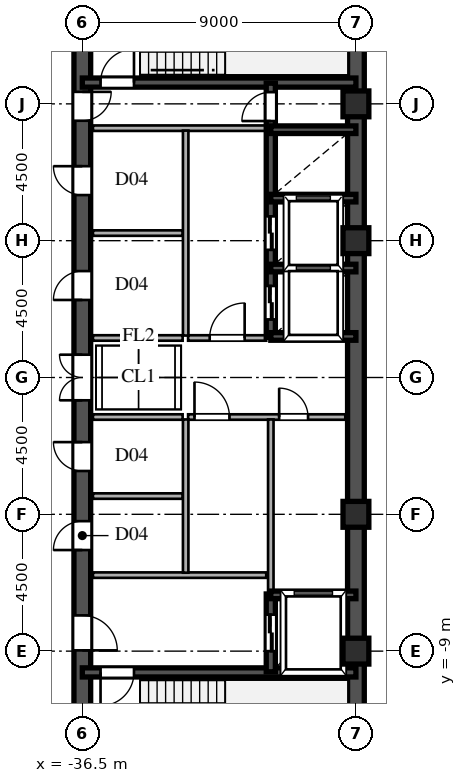
"""IFC4 building model, lengths in metres.
Left out: names, types, materials, properties, quantities, classifications, styles, units other than length and angle.
Written with IfcOpenShell. Run it as: python <this file> out.ifc"""

import sys

from ifc_helpers import new_model, si_unit, direction, frame, frame_2d, origin, origin_2d, place, context, subcontext, project, spatial, rectangle, hollow_rectangle, extrude, source, transform, mapped, element, fill, save


model = new_model("IFC4")
c1 = context("Model", 3, precision=1e-05, world=origin(), true_north=direction((0.0, 1.0)))
c2 = subcontext(c1, "Body", "Model", "MODEL_VIEW")
j1 = project(units=[si_unit("LENGTHUNIT", "METRE"), si_unit("PLANEANGLEUNIT", "RADIAN")], contexts=[c1])
p1 = place(None, origin())
s1 = spatial("IfcSite", under=j1, at=p1, CompositionType="ELEMENT")
p2 = place(p1, origin())
s2 = spatial("IfcBuilding", under=s1, at=p2, CompositionType="ELEMENT")
p3 = place(p2, frame((0.0, 0.0, 195.9)))
s3 = spatial("IfcBuildingStorey", under=s2, at=p3, CompositionType="ELEMENT", Elevation=195.9)
m1 = source(origin(), c2, "Body", "SweptSolid", [
    extrude(hollow_rectangle(XDim=0.85, YDim=0.85, WallThickness=0.036, at=origin_2d()), origin(), (0.0, 0.0, 1.0), 3.6),
])
for number, where, z_axis, x_axis in (
    (1, (-27.5, -9.0, 0.0), (0.0, 0.0, 1.0), (1.0, 0.0, 0.0)),
    (2, (-27.5, -4.5, 0.0), (0.0, 0.0, 1.0), (1.0, 0.0, 0.0)),
    (3, (-27.5, 4.5, 0.0), (0.0, 0.0, 1.0), (1.0, 0.0, 0.0)),
    (4, (-27.5, 9.0, 0.0), (0.0, 0.0, 1.0), (1.0, 0.0, 0.0)),
):
    element("IfcColumn", number, at=place(p3, frame(where, z_axis=z_axis, x_axis=x_axis)), inside=s3, PredefinedType="COLUMN", context=c2, shape_type="MappedRepresentation", body=[
        mapped(m1, transform((0.0, 0.0, 0.0), scale=1.0)),
    ])
for number, where, z_axis, x_axis in (
    (5, (-27.5, -13.5, 0.0), (0.0, 0.0, 1.0), (0.0, 1.0, 0.0)),
    (6, (-27.5, 1.3, 0.0), (0.0, 0.0, 1.0), (0.0, 1.0, 0.0)),
):
    element("IfcWall", number, at=place(p3, frame(where, z_axis=z_axis, x_axis=x_axis)), inside=s3, PredefinedType="SHEAR", context=c2, shape_type="SweptSolid", body=[
        extrude(rectangle(XDim=12.2, YDim=0.55, at=frame_2d((6.1, 0.0))), origin(), (0.0, 0.0, 1.0), 3.38),
    ])
p4 = place(p3, frame((-27.5, -1.3, 0.0), z_axis=(0.0, 0.0, 1.0), x_axis=(0.0, 1.0, 0.0)))
e7 = element("IfcWall", 7, at=p4, inside=s3, PredefinedType="SHEAR", context=c2, shape_type="SweptSolid", body=[
    extrude(rectangle(XDim=2.6, YDim=0.55, at=frame_2d((1.3, 0.0))), origin(), (0.0, 0.0, 1.0), 3.38),
])
p5 = place(p3, frame((-36.5, -13.65, 0.0), z_axis=(0.0, 0.0, 1.0), x_axis=(0.0, 1.0, 0.0)))
e8 = element("IfcWall", 8, at=p5, inside=s3, PredefinedType="SHEAR", context=c2, shape_type="SweptSolid", body=[
    extrude(rectangle(XDim=7.15, YDim=0.55, at=frame_2d((3.575, 0.0))), origin(), (0.0, 0.0, 1.0), 3.38),
])
p6 = place(p5, frame((4.675, 0.0, 0.0)))
e9 = element("IfcOpeningElement", 9, at=p6, cuts=e8, PredefinedType="OPENING", context=c2, shape_type="SweptSolid", body=[
    extrude(rectangle(XDim=1.15, YDim=2.2, at=frame_2d((0.575, 1.1))), frame((0.0, 0.285, 0.0), z_axis=(0.0, -1.0, 0.0), x_axis=(1.0, 0.0, 0.0)), (0.0, 0.0, 1.0), 0.57),
])
p7 = place(p3, frame((-36.5, -1.3, 0.0), z_axis=(0.0, 0.0, 1.0), x_axis=(0.0, 1.0, 0.0)))
e10 = element("IfcWall", 10, at=p7, inside=s3, PredefinedType="SHEAR", context=c2, shape_type="SweptSolid", body=[
    extrude(rectangle(XDim=2.6, YDim=0.55, at=frame_2d((1.3, 0.0))), origin(), (0.0, 0.0, 1.0), 3.38),
])
p8 = place(p7, frame((0.55, 0.0, 0.0)))
e11 = element("IfcOpeningElement", 11, at=p8, cuts=e10, PredefinedType="OPENING", context=c2, shape_type="SweptSolid", body=[
    extrude(rectangle(XDim=1.5, YDim=2.3, at=frame_2d((0.75, 1.15))), frame((0.0, 0.285, 0.0), z_axis=(0.0, -1.0, 0.0), x_axis=(1.0, 0.0, 0.0)), (0.0, 0.0, 1.0), 0.57),
])
p9 = place(p3, frame((-36.5, 8.2, 0.0), z_axis=(0.0, 0.0, 1.0), x_axis=(0.0, 1.0, 0.0)))
e12 = element("IfcWall", 12, at=p9, inside=s3, PredefinedType="SHEAR", context=c2, shape_type="SweptSolid", body=[
    extrude(rectangle(XDim=5.45, YDim=0.55, at=frame_2d((2.725, 0.0))), origin(), (0.0, 0.0, 1.0), 3.38),
])
p10 = place(p9, frame((0.245, 0.0, 0.0)))
e13 = element("IfcOpeningElement", 13, at=p10, cuts=e12, PredefinedType="OPENING", context=c2, shape_type="SweptSolid", body=[
    extrude(rectangle(XDim=0.95, YDim=2.15, at=frame_2d((0.475, 1.075))), frame((0.0, 0.285, 0.0), z_axis=(0.0, -1.0, 0.0), x_axis=(1.0, 0.0, 0.0)), (0.0, 0.0, 1.0), 0.57),
])
p11 = place(p3, frame((-36.5, -6.5, 0.0), z_axis=(0.0, 0.0, 1.0), x_axis=(0.0, 1.0, 0.0)))
e14 = element("IfcWall", 14, at=p11, inside=s3, PredefinedType="SHEAR", context=c2, shape_type="SweptSolid", body=[
    extrude(rectangle(XDim=2.6, YDim=0.55, at=frame_2d((1.3, 0.0))), origin(), (0.0, 0.0, 1.0), 3.38),
])
p12 = place(p11, frame((0.825, 0.0, 0.0)))
e15 = element("IfcOpeningElement", 15, at=p12, cuts=e14, PredefinedType="OPENING", context=c2, shape_type="SweptSolid", body=[
    extrude(rectangle(XDim=0.95, YDim=2.15, at=frame_2d((0.475, 1.075))), frame((0.0, 0.285, 0.0), z_axis=(0.0, -1.0, 0.0), x_axis=(1.0, 0.0, 0.0)), (0.0, 0.0, 1.0), 0.57),
])
p13 = place(p3, frame((-36.5, -3.9, 0.0), z_axis=(0.0, 0.0, 1.0), x_axis=(0.0, 1.0, 0.0)))
e16 = element("IfcWall", 16, at=p13, inside=s3, PredefinedType="SHEAR", context=c2, shape_type="SweptSolid", body=[
    extrude(rectangle(XDim=2.6, YDim=0.55, at=frame_2d((1.3, 0.0))), origin(), (0.0, 0.0, 1.0), 3.38),
])
p14 = place(p13, frame((0.825, 0.0, 0.0)))
e17 = element("IfcOpeningElement", 17, at=p14, cuts=e16, PredefinedType="OPENING", context=c2, shape_type="SweptSolid", body=[
    extrude(rectangle(XDim=0.95, YDim=2.15, at=frame_2d((0.475, 1.075))), frame((0.0, 0.285, 0.0), z_axis=(0.0, -1.0, 0.0), x_axis=(1.0, 0.0, 0.0)), (0.0, 0.0, 1.0), 0.57),
])
p15 = place(p3, frame((-36.5, 1.3, 0.0), z_axis=(0.0, 0.0, 1.0), x_axis=(0.0, 1.0, 0.0)))
e18 = element("IfcWall", 18, at=p15, inside=s3, PredefinedType="SHEAR", context=c2, shape_type="SweptSolid", body=[
    extrude(rectangle(XDim=3.45, YDim=0.55, at=frame_2d((1.725, 0.0))), origin(), (0.0, 0.0, 1.0), 3.38),
])
p16 = place(p15, frame((1.25, 0.0, 0.0)))
e19 = element("IfcOpeningElement", 19, at=p16, cuts=e18, PredefinedType="OPENING", context=c2, shape_type="SweptSolid", body=[
    extrude(rectangle(XDim=0.95, YDim=2.15, at=frame_2d((0.475, 1.075))), frame((0.0, 0.285, 0.0), z_axis=(0.0, -1.0, 0.0), x_axis=(1.0, 0.0, 0.0)), (0.0, 0.0, 1.0), 0.57),
])
p17 = place(p3, frame((-36.5, 4.75, 0.0), z_axis=(0.0, 0.0, 1.0), x_axis=(0.0, 1.0, 0.0)))
e20 = element("IfcWall", 20, at=p17, inside=s3, PredefinedType="SHEAR", context=c2, shape_type="SweptSolid", body=[
    extrude(rectangle(XDim=3.45, YDim=0.55, at=frame_2d((1.725, 0.0))), origin(), (0.0, 0.0, 1.0), 3.38),
])
p18 = place(p17, frame((1.25, 0.0, 0.0)))
e21 = element("IfcOpeningElement", 21, at=p18, cuts=e20, PredefinedType="OPENING", context=c2, shape_type="SweptSolid", body=[
    extrude(rectangle(XDim=0.95, YDim=2.15, at=frame_2d((0.475, 1.075))), frame((0.0, 0.285, 0.0), z_axis=(0.0, -1.0, 0.0), x_axis=(1.0, 0.0, 0.0)), (0.0, 0.0, 1.0), 0.57),
])
p19 = place(p3, frame((-36.5, -9.7, 0.0), z_axis=(0.0, 0.0, 1.0), x_axis=(1.0, 0.0, 0.0)))
e22 = element("IfcWall", 22, at=p19, inside=s3, PredefinedType="SHEAR", context=c2, shape_type="SweptSolid", body=[
    extrude(rectangle(XDim=9.0, YDim=0.3, at=frame_2d((4.5, 0.0))), origin(), (0.0, 0.0, 1.0), 3.38),
])
p20 = place(p19, frame((0.6, 0.0, 0.0)))
e23 = element("IfcOpeningElement", 23, at=p20, cuts=e22, PredefinedType="OPENING", context=c2, shape_type="SweptSolid", body=[
    extrude(rectangle(XDim=1.1, YDim=2.2, at=frame_2d((0.55, 1.1))), frame((0.0, 0.16, 0.0), z_axis=(0.0, -1.0, 0.0), x_axis=(1.0, 0.0, 0.0)), (0.0, 0.0, 1.0), 0.32),
])
p21 = place(p3, frame((-36.5, 9.7, 0.0), z_axis=(0.0, 0.0, 1.0), x_axis=(1.0, 0.0, 0.0)))
e24 = element("IfcWall", 24, at=p21, inside=s3, PredefinedType="SHEAR", context=c2, shape_type="SweptSolid", body=[
    extrude(rectangle(XDim=9.0, YDim=0.3, at=frame_2d((4.5, 0.0))), origin(), (0.0, 0.0, 1.0), 3.38),
])
p22 = place(p21, frame((0.6, 0.0, 0.0)))
e25 = element("IfcOpeningElement", 25, at=p22, cuts=e24, PredefinedType="OPENING", context=c2, shape_type="SweptSolid", body=[
    extrude(rectangle(XDim=1.1, YDim=2.2, at=frame_2d((0.55, 1.1))), frame((0.0, 0.16, 0.0), z_axis=(0.0, -1.0, 0.0), x_axis=(1.0, 0.0, 0.0)), (0.0, 0.0, 1.0), 0.32),
])
for number, where, z_axis, x_axis in (
    (26, (-30.3, -7.15, 0.0), (0.0, 0.0, 1.0), (1.0, 0.0, 0.0)),
    (27, (-30.3, 1.35, 0.0), (0.0, 0.0, 1.0), (1.0, 0.0, 0.0)),
    (28, (-30.3, 3.6, 0.0), (0.0, 0.0, 1.0), (1.0, 0.0, 0.0)),
    (29, (-30.3, 5.9, 0.0), (0.0, 0.0, 1.0), (1.0, 0.0, 0.0)),
    (30, (-30.3, 8.15, 0.0), (0.0, 0.0, 1.0), (1.0, 0.0, 0.0)),
):
    element("IfcWall", number, at=place(p3, frame(where, z_axis=z_axis, x_axis=x_axis)), inside=s3, PredefinedType="SHEAR", context=c2, shape_type="SweptSolid", body=[
        extrude(rectangle(XDim=2.8, YDim=0.25, at=frame_2d((1.4, 0.0))), origin(), (0.0, 0.0, 1.0), 3.38),
    ])
p23 = place(p3, frame((-30.3, -9.68, 0.0), z_axis=(0.0, 0.0, 1.0), x_axis=(0.0, 1.0, 0.0)))
e31 = element("IfcWall", 31, at=p23, inside=s3, PredefinedType="SHEAR", context=c2, shape_type="SweptSolid", body=[
    extrude(rectangle(XDim=2.56, YDim=0.3, at=frame_2d((1.28, 0.0))), origin(), (0.0, 0.0, 1.0), 3.38),
])
p24 = place(p23, frame((0.68, 0.0, 0.0)))
e32 = element("IfcOpeningElement", 32, at=p24, cuts=e31, PredefinedType="OPENING", context=c2, shape_type="SweptSolid", body=[
    extrude(rectangle(XDim=1.2, YDim=2.25, at=frame_2d((0.6, 1.125))), frame((0.0, 0.16, 0.0), z_axis=(0.0, -1.0, 0.0), x_axis=(1.0, 0.0, 0.0)), (0.0, 0.0, 1.0), 0.32),
])
p25 = place(p3, frame((-30.3, 1.32, 0.0), z_axis=(0.0, 0.0, 1.0), x_axis=(0.0, 1.0, 0.0)))
e33 = element("IfcWall", 33, at=p25, inside=s3, PredefinedType="SHEAR", context=c2, shape_type="SweptSolid", body=[
    extrude(rectangle(XDim=2.28, YDim=0.3, at=frame_2d((1.14, 0.0))), origin(), (0.0, 0.0, 1.0), 3.38),
])
p26 = place(p25, frame((0.59, 0.0, 0.0)))
e34 = element("IfcOpeningElement", 34, at=p26, cuts=e33, PredefinedType="OPENING", context=c2, shape_type="SweptSolid", body=[
    extrude(rectangle(XDim=1.1, YDim=2.2, at=frame_2d((0.55, 1.1))), frame((0.0, 0.16, 0.0), z_axis=(0.0, -1.0, 0.0), x_axis=(1.0, 0.0, 0.0)), (0.0, 0.0, 1.0), 0.32),
])
p27 = place(p3, frame((-30.3, 3.6, 0.0), z_axis=(0.0, 0.0, 1.0), x_axis=(0.0, 1.0, 0.0)))
e35 = element("IfcWall", 35, at=p27, inside=s3, PredefinedType="SHEAR", context=c2, shape_type="SweptSolid", body=[
    extrude(rectangle(XDim=2.3, YDim=0.3, at=frame_2d((1.15, 0.0))), origin(), (0.0, 0.0, 1.0), 3.38),
])
p28 = place(p27, frame((0.6, 0.0, 0.0)))
e36 = element("IfcOpeningElement", 36, at=p28, cuts=e35, PredefinedType="OPENING", context=c2, shape_type="SweptSolid", body=[
    extrude(rectangle(XDim=1.1, YDim=2.2, at=frame_2d((0.55, 1.1))), frame((0.0, 0.16, 0.0), z_axis=(0.0, -1.0, 0.0), x_axis=(1.0, 0.0, 0.0)), (0.0, 0.0, 1.0), 0.32),
])
p29 = place(p3, frame((-30.3, 5.9, 0.0), z_axis=(0.0, 0.0, 1.0), x_axis=(0.0, 1.0, 0.0)))
e37 = element("IfcWall", 37, at=p29, inside=s3, PredefinedType="SHEAR", context=c2, shape_type="SweptSolid", body=[
    extrude(rectangle(XDim=2.25, YDim=0.3, at=frame_2d((1.125, 0.0))), origin(), (0.0, 0.0, 1.0), 3.38),
])
p30 = place(p3, frame((-30.3, 8.15, 0.0), z_axis=(0.0, 0.0, 1.0), x_axis=(0.0, 1.0, 0.0)))
e38 = element("IfcWall", 38, at=p30, inside=s3, PredefinedType="SHEAR", context=c2, shape_type="SweptSolid", body=[
    extrude(rectangle(XDim=1.53, YDim=0.3, at=frame_2d((0.765, 0.0))), origin(), (0.0, 0.0, 1.0), 3.38),
])
p31 = place(p30, frame((0.285, 0.0, 0.0)))
e39 = element("IfcOpeningElement", 39, at=p31, cuts=e38, PredefinedType="OPENING", context=c2, shape_type="SweptSolid", body=[
    extrude(rectangle(XDim=0.95, YDim=2.15, at=frame_2d((0.475, 1.075))), frame((0.0, 0.16, 0.0), z_axis=(0.0, -1.0, 0.0), x_axis=(1.0, 0.0, 0.0)), (0.0, 0.0, 1.0), 0.32),
])
for number, where, z_axis, x_axis in (
    (40, (-36.15, -6.5, 0.0), (0.0, 0.0, 1.0), (1.0, 0.0, 0.0)),
    (41, (-36.15, 8.2, 0.0), (0.0, 0.0, 1.0), (1.0, 0.0, 0.0)),
):
    element("IfcWall", number, at=place(p3, frame(where, z_axis=z_axis, x_axis=x_axis)), inside=s3, PredefinedType="PARTITIONING", context=c2, shape_type="SweptSolid", body=[
        extrude(rectangle(XDim=5.7, YDim=0.18, at=frame_2d((2.85, 0.0))), origin(), (0.0, 0.0, 1.0), 3.38),
    ])
p32 = place(p3, frame((-33.1, -6.42, 0.0), z_axis=(0.0, 0.0, 1.0), x_axis=(0.0, 1.0, 0.0)))
e42 = element("IfcWall", 42, at=p32, inside=s3, PredefinedType="PARTITIONING", context=c2, shape_type="SweptSolid", body=[
    extrude(rectangle(XDim=5.04, YDim=0.18, at=frame_2d((2.52, 0.0))), origin(), (0.0, 0.0, 1.0), 3.38),
])
p33 = place(p3, frame((-33.1, 1.38, 0.0), z_axis=(0.0, 0.0, 1.0), x_axis=(0.0, 1.0, 0.0)))
e43 = element("IfcWall", 43, at=p33, inside=s3, PredefinedType="PARTITIONING", context=c2, shape_type="SweptSolid", body=[
    extrude(rectangle(XDim=6.74, YDim=0.18, at=frame_2d((3.37, 0.0))), origin(), (0.0, 0.0, 1.0), 3.38),
])
p34 = place(p3, frame((-30.3, -1.3, 0.0), z_axis=(0.0, 0.0, 1.0), x_axis=(1.0, 0.0, 0.0)))
e44 = element("IfcWall", 44, at=p34, inside=s3, PredefinedType="PARTITIONING", context=c2, shape_type="SweptSolid", body=[
    extrude(rectangle(XDim=2.45, YDim=0.18, at=frame_2d((1.225, 0.0))), origin(), (0.0, 0.0, 1.0), 3.38),
])
p35 = place(p34, frame((0.275, 0.0, 0.0)))
e45 = element("IfcOpeningElement", 45, at=p35, cuts=e44, PredefinedType="OPENING", context=c2, shape_type="SweptSolid", body=[
    extrude(rectangle(XDim=0.95, YDim=2.15, at=frame_2d((0.475, 1.075))), frame((0.0, 0.1, 0.0), z_axis=(0.0, -1.0, 0.0), x_axis=(1.0, 0.0, 0.0)), (0.0, 0.0, 1.0), 0.2),
])
p36 = place(p3, frame((-33.02, -1.3, 0.0), z_axis=(0.0, 0.0, 1.0), x_axis=(1.0, 0.0, 0.0)))
e46 = element("IfcWall", 46, at=p36, inside=s3, PredefinedType="PARTITIONING", context=c2, shape_type="SweptSolid", body=[
    extrude(rectangle(XDim=2.72, YDim=0.18, at=frame_2d((1.36, 0.0))), origin(), (0.0, 0.0, 1.0), 3.38),
])
p37 = place(p36, frame((0.21, 0.0, 0.0)))
e47 = element("IfcOpeningElement", 47, at=p37, cuts=e46, PredefinedType="OPENING", context=c2, shape_type="SweptSolid", body=[
    extrude(rectangle(XDim=1.15, YDim=2.2, at=frame_2d((0.575, 1.1))), frame((0.0, 0.1, 0.0), z_axis=(0.0, -1.0, 0.0), x_axis=(1.0, 0.0, 0.0)), (0.0, 0.0, 1.0), 0.2),
])
p38 = place(p3, frame((-30.3, -7.12, 0.0), z_axis=(0.0, 0.0, 1.0), x_axis=(0.0, 1.0, 0.0)))
e48 = element("IfcWall", 48, at=p38, inside=s3, PredefinedType="PARTITIONING", context=c2, shape_type="SweptSolid", body=[
    extrude(rectangle(XDim=5.74, YDim=0.18, at=frame_2d((2.87, 0.0))), origin(), (0.0, 0.0, 1.0), 3.38),
])
p39 = place(p3, frame((-33.02, 1.3, 0.0), z_axis=(0.0, 0.0, 1.0), x_axis=(1.0, 0.0, 0.0)))
e49 = element("IfcWall", 49, at=p39, inside=s3, PredefinedType="PARTITIONING", context=c2, shape_type="SweptSolid", body=[
    extrude(rectangle(XDim=2.57, YDim=0.18, at=frame_2d((1.285, 0.0))), origin(), (0.0, 0.0, 1.0), 3.38),
])
p40 = place(p39, frame((0.71, 0.0, 0.0)))
e50 = element("IfcOpeningElement", 50, at=p40, cuts=e49, PredefinedType="OPENING", context=c2, shape_type="SweptSolid", body=[
    extrude(rectangle(XDim=1.15, YDim=2.2, at=frame_2d((0.575, 1.1))), frame((0.0, 0.1, 0.0), z_axis=(0.0, -1.0, 0.0), x_axis=(1.0, 0.0, 0.0)), (0.0, 0.0, 1.0), 0.2),
])
for number, where, z_axis, x_axis in (
    (51, (-36.15, -1.3, 0.0), (0.0, 0.0, 1.0), (1.0, 0.0, 0.0)),
    (52, (-36.15, 1.3, 0.0), (0.0, 0.0, 1.0), (1.0, 0.0, 0.0)),
    (53, (-36.15, -3.9, 0.0), (0.0, 0.0, 1.0), (1.0, 0.0, 0.0)),
    (54, (-36.15, 4.75, 0.0), (0.0, 0.0, 1.0), (1.0, 0.0, 0.0)),
):
    element("IfcWall", number, at=place(p3, frame(where, z_axis=z_axis, x_axis=x_axis)), inside=s3, PredefinedType="PARTITIONING", context=c2, shape_type="SweptSolid", body=[
        extrude(rectangle(XDim=2.95, YDim=0.18, at=frame_2d((1.475, 0.0))), origin(), (0.0, 0.0, 1.0), 3.38),
    ])
m2 = source(origin(), c2, "Body", "SweptSolid", [
    extrude(rectangle(XDim=1.15, YDim=2.2, at=frame_2d((0.575, 1.1))), frame((0.0, 0.025, 0.0), z_axis=(0.0, -1.0, 0.0), x_axis=(1.0, 0.0, 0.0)), (0.0, 0.0, 1.0), 0.05),
])
p41 = place(p6, frame((1.15, 0.0, 0.0), z_axis=(0.0, 0.0, 1.0), x_axis=(-1.0, 0.0, 0.0)))
e55 = element("IfcDoor", 55, at=p41, inside=s3, OperationType="SINGLE_SWING_LEFT", PredefinedType="DOOR", context=c2, shape_type="MappedRepresentation", body=[
    mapped(m2, transform((0.0, 0.0, 0.0), scale=1.0)),
])
fill(e9, e55)
m3 = source(origin(), c2, "Body", "SweptSolid", [
    extrude(rectangle(XDim=1.5, YDim=2.3, at=frame_2d((0.75, 1.15))), frame((0.0, 0.025, 0.0), z_axis=(0.0, -1.0, 0.0), x_axis=(1.0, 0.0, 0.0)), (0.0, 0.0, 1.0), 0.05),
])
p42 = place(p8, origin())
e56 = element("IfcDoor", 56, at=p42, inside=s3, OperationType="DOUBLE_SWING_LEFT", PredefinedType="DOOR", context=c2, shape_type="MappedRepresentation", body=[
    mapped(m3, transform((0.0, 0.0, 0.0), scale=1.0)),
])
fill(e11, e56)
m4 = source(origin(), c2, "Body", "SweptSolid", [
    extrude(rectangle(XDim=0.95, YDim=2.15, at=frame_2d((0.475, 1.075))), frame((0.0, 0.025, 0.0), z_axis=(0.0, -1.0, 0.0), x_axis=(1.0, 0.0, 0.0)), (0.0, 0.0, 1.0), 0.05),
])
p43 = place(p10, frame((0.95, 0.0, 0.0), z_axis=(0.0, 0.0, 1.0), x_axis=(-1.0, 0.0, 0.0)))
e57 = element("IfcDoor", 57, at=p43, inside=s3, OperationType="SINGLE_SWING_RIGHT", PredefinedType="DOOR", context=c2, shape_type="MappedRepresentation", body=[
    mapped(m4, transform((0.0, 0.0, 0.0), scale=1.0)),
])
fill(e13, e57)
p44 = place(p12, origin())
e58 = element("IfcDoor", 58, at=p44, inside=s3, OperationType="SINGLE_SWING_LEFT", PredefinedType="DOOR", context=c2, shape_type="MappedRepresentation", body=[
    mapped(m4, transform((0.0, 0.0, 0.0), scale=1.0)),
])
fill(e15, e58)
p45 = place(p14, origin())
e59 = element("IfcDoor", 59, at=p45, inside=s3, OperationType="SINGLE_SWING_RIGHT", PredefinedType="DOOR", context=c2, shape_type="MappedRepresentation", body=[
    mapped(m4, transform((0.0, 0.0, 0.0), scale=1.0)),
])
fill(e17, e59)
p46 = place(p16, origin())
e60 = element("IfcDoor", 60, at=p46, inside=s3, OperationType="SINGLE_SWING_LEFT", PredefinedType="DOOR", context=c2, shape_type="MappedRepresentation", body=[
    mapped(m4, transform((0.0, 0.0, 0.0), scale=1.0)),
])
fill(e19, e60)
p47 = place(p18, origin())
e61 = element("IfcDoor", 61, at=p47, inside=s3, OperationType="SINGLE_SWING_RIGHT", PredefinedType="DOOR", context=c2, shape_type="MappedRepresentation", body=[
    mapped(m4, transform((0.0, 0.0, 0.0), scale=1.0)),
])
fill(e21, e61)
m5 = source(origin(), c2, "Body", "SweptSolid", [
    extrude(rectangle(XDim=1.1, YDim=2.2, at=frame_2d((0.55, 1.1))), frame((0.0, 0.025, 0.0), z_axis=(0.0, -1.0, 0.0), x_axis=(1.0, 0.0, 0.0)), (0.0, 0.0, 1.0), 0.05),
])
p48 = place(p20, frame((1.1, 0.0, 0.0), z_axis=(0.0, 0.0, 1.0), x_axis=(-1.0, 0.0, 0.0)))
e62 = element("IfcDoor", 62, at=p48, inside=s3, OperationType="SINGLE_SWING_LEFT", PredefinedType="DOOR", context=c2, shape_type="MappedRepresentation", body=[
    mapped(m5, transform((0.0, 0.0, 0.0), scale=1.0)),
])
fill(e23, e62)
p49 = place(p22, origin())
e63 = element("IfcDoor", 63, at=p49, inside=s3, OperationType="SINGLE_SWING_RIGHT", PredefinedType="DOOR", context=c2, shape_type="MappedRepresentation", body=[
    mapped(m5, transform((0.0, 0.0, 0.0), scale=1.0)),
])
fill(e25, e63)
m6 = source(origin(), c2, "Body", "SweptSolid", [
    extrude(rectangle(XDim=1.2, YDim=2.25, at=frame_2d((0.6, 1.125))), frame((0.0, 0.025, 0.0), z_axis=(0.0, -1.0, 0.0), x_axis=(1.0, 0.0, 0.0)), (0.0, 0.0, 1.0), 0.05),
])
p50 = place(p24, origin())
e64 = element("IfcDoor", 64, at=p50, inside=s3, OperationType="DOUBLE_DOOR_SLIDING", PredefinedType="DOOR", context=c2, shape_type="MappedRepresentation", body=[
    mapped(m6, transform((0.0, 0.0, 0.0), scale=1.0)),
])
fill(e32, e64)
m7 = source(origin(), c2, "Body", "SweptSolid", [
    extrude(rectangle(XDim=1.1, YDim=2.2, at=frame_2d((0.55, 1.1))), frame((0.0, 0.025, 0.0), z_axis=(0.0, -1.0, 0.0), x_axis=(1.0, 0.0, 0.0)), (0.0, 0.0, 1.0), 0.05),
])
p51 = place(p26, origin())
e65 = element("IfcDoor", 65, at=p51, inside=s3, OperationType="DOUBLE_DOOR_SLIDING", PredefinedType="DOOR", context=c2, shape_type="MappedRepresentation", body=[
    mapped(m7, transform((0.0, 0.0, 0.0), scale=1.0)),
])
fill(e34, e65)
p52 = place(p28, origin())
e66 = element("IfcDoor", 66, at=p52, inside=s3, OperationType="DOUBLE_DOOR_SLIDING", PredefinedType="DOOR", context=c2, shape_type="MappedRepresentation", body=[
    mapped(m7, transform((0.0, 0.0, 0.0), scale=1.0)),
])
fill(e36, e66)
p53 = place(p31, origin())
e67 = element("IfcDoor", 67, at=p53, inside=s3, OperationType="SINGLE_SWING_LEFT", PredefinedType="DOOR", context=c2, shape_type="MappedRepresentation", body=[
    mapped(m4, transform((0.0, 0.0, 0.0), scale=1.0)),
])
fill(e39, e67)
p54 = place(p35, origin())
e68 = element("IfcDoor", 68, at=p54, inside=s3, OperationType="SINGLE_SWING_LEFT", PredefinedType="DOOR", context=c2, shape_type="MappedRepresentation", body=[
    mapped(m4, transform((0.0, 0.0, 0.0), scale=1.0)),
])
fill(e45, e68)
p55 = place(p37, origin())
e69 = element("IfcDoor", 69, at=p55, inside=s3, OperationType="SINGLE_SWING_LEFT", PredefinedType="DOOR", context=c2, shape_type="MappedRepresentation", body=[
    mapped(m2, transform((0.0, 0.0, 0.0), scale=1.0)),
])
fill(e47, e69)
p56 = place(p40, origin())
e70 = element("IfcDoor", 70, at=p56, inside=s3, OperationType="SINGLE_SWING_RIGHT", PredefinedType="DOOR", context=c2, shape_type="MappedRepresentation", body=[
    mapped(m2, transform((0.0, 0.0, 0.0), scale=1.0)),
])
fill(e50, e70)
save(model, sys.argv[1])
